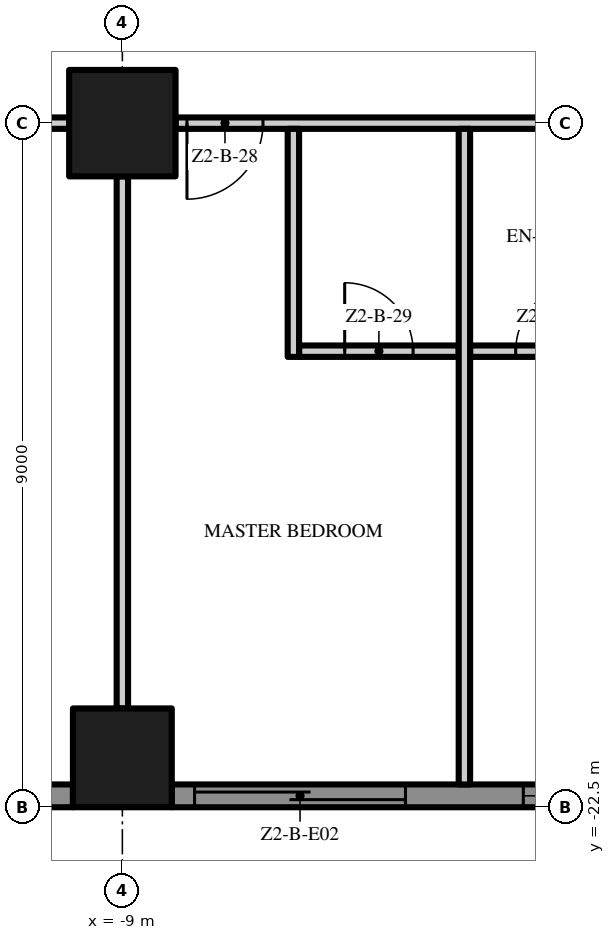
"""IFC4 building model, lengths in metres.
Left out: names, types, materials, properties, quantities, classifications, styles, units other than length and angle.
Written with IfcOpenShell. Run it as: python <this file> out.ifc"""

import sys

from ifc_helpers import new_model, si_unit, direction, frame, frame_2d, origin, origin_2d, place, context, subcontext, project, spatial, polyline, rectangle, outline, extrude, element, fill, save


model = new_model("IFC4")
c1 = context("Model", 3, precision=1e-05, world=origin(), true_north=direction((0.0, 1.0)))
c2 = subcontext(c1, "Body", "Model", "MODEL_VIEW")
j1 = project(units=[si_unit("LENGTHUNIT", "METRE"), si_unit("PLANEANGLEUNIT", "RADIAN")], contexts=[c1])
p1 = place(None, origin())
s1 = spatial("IfcSite", under=j1, at=p1, CompositionType="ELEMENT")
p2 = place(p1, origin())
s2 = spatial("IfcBuilding", under=s1, at=p2, CompositionType="ELEMENT")
p3 = place(p2, frame((0.0, 0.0, 88.4)))
s3 = spatial("IfcBuildingStorey", under=s2, at=p3, CompositionType="ELEMENT", Elevation=88.4)
p4 = place(p3, frame((-9.0, -13.5, 0.0), z_axis=(0.0, 0.0, 1.0), x_axis=(1.0, 0.0, 0.0)))
e1 = element("IfcColumn", 1, at=p4, inside=s3, PredefinedType="COLUMN", context=c2, shape_type="SweptSolid", body=[
    extrude(rectangle(XDim=1.4, YDim=1.4, at=origin_2d()), origin(), (0.0, 0.0, 1.0), 3.5),
])
p5 = place(p3, frame((-9.0, -21.85, 0.0), z_axis=(0.0, 0.0, 1.0), x_axis=(1.0, 0.0, 0.0)))
e2 = element("IfcColumn", 2, at=p5, inside=s3, PredefinedType="COLUMN", context=c2, shape_type="SweptSolid", body=[
    extrude(rectangle(XDim=1.3, YDim=1.3, at=origin_2d()), origin(), (0.0, 0.0, 1.0), 3.5),
])
p6 = place(p3, frame((-9.65, -22.35, 0.0), z_axis=(0.0, 0.0, 1.0), x_axis=(-1.0, 0.0, 0.0)))
e3 = element("IfcWall", 3, at=p6, inside=s3, PredefinedType="SOLIDWALL", context=c2, shape_type="SweptSolid", body=[
    extrude(rectangle(XDim=7.7, YDim=0.3, at=frame_2d((3.85, 0.0))), origin(), (0.0, 0.0, 1.0), 3.5),
])
p7 = place(p6, frame((4.625, 0.0, 0.45)))
e4 = element("IfcOpeningElement", 4, at=p7, cuts=e3, PredefinedType="OPENING", context=c2, shape_type="SweptSolid", body=[
    extrude(rectangle(XDim=2.775, YDim=2.65, at=frame_2d((1.387, 1.325))), frame((0.0, 0.16, 0.0), z_axis=(0.0, -1.0, 0.0), x_axis=(1.0, 0.0, 0.0)), (0.0, 0.0, 1.0), 0.32),
])
p8 = place(p6, frame((0.3, 0.0, 0.0)))
e5 = element("IfcOpeningElement", 5, at=p8, cuts=e3, PredefinedType="OPENING", context=c2, shape_type="SweptSolid", body=[
    extrude(rectangle(XDim=2.775, YDim=2.4, at=frame_2d((1.387, 1.2))), frame((0.0, 0.16, 0.0), z_axis=(0.0, -1.0, 0.0), x_axis=(1.0, 0.0, 0.0)), (0.0, 0.0, 1.0), 0.32),
])
p9 = place(p3, frame((-0.65, -22.35, 0.0), z_axis=(0.0, 0.0, 1.0), x_axis=(-1.0, 0.0, 0.0)))
e6 = element("IfcWall", 6, at=p9, inside=s3, PredefinedType="SOLIDWALL", context=c2, shape_type="SweptSolid", body=[
    extrude(rectangle(XDim=7.7, YDim=0.3, at=frame_2d((3.85, 0.0))), origin(), (0.0, 0.0, 1.0), 3.5),
])
p10 = place(p9, frame((4.625, 0.0, 0.0)))
e7 = element("IfcOpeningElement", 7, at=p10, cuts=e6, PredefinedType="OPENING", context=c2, shape_type="SweptSolid", body=[
    extrude(rectangle(XDim=2.775, YDim=2.4, at=frame_2d((1.387, 1.2))), frame((0.0, 0.16, 0.0), z_axis=(0.0, -1.0, 0.0), x_axis=(1.0, 0.0, 0.0)), (0.0, 0.0, 1.0), 0.32),
])
p11 = place(p9, frame((0.3, 0.0, 0.45)))
e8 = element("IfcOpeningElement", 8, at=p11, cuts=e6, PredefinedType="OPENING", context=c2, shape_type="SweptSolid", body=[
    extrude(rectangle(XDim=2.775, YDim=2.65, at=frame_2d((1.387, 1.325))), frame((0.0, 0.16, 0.0), z_axis=(0.0, -1.0, 0.0), x_axis=(1.0, 0.0, 0.0)), (0.0, 0.0, 1.0), 0.32),
])
p12 = place(p3, origin())
e9 = element("IfcWall", 9, at=p12, inside=s3, PredefinedType="USERDEFINED", context=c2, shape_type="SweptSolid", body=[
    extrude(outline(polyline([(-22.5, -25.149), (-21.0, -24.488), (-19.5, -23.755), (-18.0, -23.231), (-16.875, -23.1), (-16.5, -23.115), (-15.0, -23.451), (-13.5, -24.112), (-12.0, -24.845), (-10.5, -25.369), (-9.375, -25.5), (-9.0, -25.485), (-7.5, -25.149), (-6.0, -24.488), (-4.5, -23.755), (-3.0, -23.231), (-1.875, -23.1), (-1.5, -23.115), (0.0, -23.451), (1.5, -24.112), (3.0, -24.845), (4.5, -25.369), (5.625, -25.5), (6.0, -25.485), (7.5, -25.149), (9.0, -24.488), (10.5, -23.755), (12.0, -23.231), (13.125, -23.1), (13.5, -23.115), (15.0, -23.451), (16.5, -24.112), (18.0, -24.845), (19.5, -25.369), (20.625, -25.5), (21.0, -25.485), (22.5, -25.149), (22.445, -24.905), (20.967, -25.236), (20.635, -25.249), (19.556, -25.124), (18.096, -24.614), (16.605, -23.885), (15.079, -23.213), (13.533, -22.866), (13.115, -22.849), (11.944, -22.986), (10.404, -23.524), (8.895, -24.261), (7.421, -24.91), (5.967, -25.236), (5.635, -25.249), (4.556, -25.124), (3.096, -24.614), (1.605, -23.885), (0.079, -23.213), (-1.467, -22.866), (-1.885, -22.849), (-3.056, -22.986), (-4.596, -23.524), (-6.105, -24.261), (-7.579, -24.91), (-9.033, -25.236), (-9.365, -25.249), (-10.444, -25.124), (-11.904, -24.614), (-13.395, -23.885), (-14.921, -23.213), (-16.467, -22.866), (-16.885, -22.849), (-18.056, -22.986), (-19.596, -23.524), (-21.105, -24.261), (-22.601, -24.92), (-22.5, -25.149)])), origin(), (0.0, 0.0, 1.0), 0.9),
])
p13 = place(p3, frame((-6.675, -16.5, 0.0), z_axis=(0.0, 0.0, 1.0), x_axis=(1.0, 0.0, 0.0)))
e10 = element("IfcWall", 10, at=p13, inside=s3, PredefinedType="PARTITIONING", context=c2, shape_type="SweptSolid", body=[
    extrude(rectangle(XDim=2.1, YDim=0.15, at=frame_2d((1.05, 0.0))), origin(), (0.0, 0.0, 1.0), 3.5),
])
p14 = place(p13, frame((0.6, 0.0, 0.0)))
e11 = element("IfcOpeningElement", 11, at=p14, cuts=e10, PredefinedType="OPENING", context=c2, shape_type="SweptSolid", body=[
    extrude(rectangle(XDim=0.9, YDim=2.1, at=frame_2d((0.45, 1.05))), frame((0.0, 0.085, 0.0), z_axis=(0.0, -1.0, 0.0), x_axis=(1.0, 0.0, 0.0)), (0.0, 0.0, 1.0), 0.17),
])
p15 = place(p3, frame((-4.425, -16.5, 0.0), z_axis=(0.0, 0.0, 1.0), x_axis=(1.0, 0.0, 0.0)))
e12 = element("IfcWall", 12, at=p15, inside=s3, PredefinedType="PARTITIONING", context=c2, shape_type="SweptSolid", body=[
    extrude(rectangle(XDim=2.1, YDim=0.15, at=frame_2d((1.05, 0.0))), origin(), (0.0, 0.0, 1.0), 3.5),
])
p16 = place(p15, frame((0.6, 0.0, 0.0)))
e13 = element("IfcOpeningElement", 13, at=p16, cuts=e12, PredefinedType="OPENING", context=c2, shape_type="SweptSolid", body=[
    extrude(rectangle(XDim=0.9, YDim=2.1, at=frame_2d((0.45, 1.05))), frame((0.0, 0.085, 0.0), z_axis=(0.0, -1.0, 0.0), x_axis=(1.0, 0.0, 0.0)), (0.0, 0.0, 1.0), 0.17),
])
p17 = place(p3, frame((-9.7, -13.5, 0.0), z_axis=(0.0, 0.0, 1.0), x_axis=(-1.0, 0.0, 0.0)))
e14 = element("IfcWall", 14, at=p17, inside=s3, PredefinedType="PARTITIONING", context=c2, shape_type="SweptSolid", body=[
    extrude(rectangle(XDim=7.6, YDim=0.15, at=frame_2d((3.8, 0.0))), origin(), (0.0, 0.0, 1.0), 3.5),
])
p18 = place(p17, frame((4.0, 0.0, 0.0)))
e15 = element("IfcOpeningElement", 15, at=p18, cuts=e14, PredefinedType="OPENING", context=c2, shape_type="SweptSolid", body=[
    extrude(rectangle(XDim=1.8, YDim=2.4, at=frame_2d((0.9, 1.2))), frame((0.0, 0.085, 0.0), z_axis=(0.0, -1.0, 0.0), x_axis=(1.0, 0.0, 0.0)), (0.0, 0.0, 1.0), 0.17),
])
p19 = place(p3, frame((-0.7, -13.5, 0.0), z_axis=(0.0, 0.0, 1.0), x_axis=(-1.0, 0.0, 0.0)))
e16 = element("IfcWall", 16, at=p19, inside=s3, PredefinedType="PARTITIONING", context=c2, shape_type="SweptSolid", body=[
    extrude(rectangle(XDim=7.6, YDim=0.15, at=frame_2d((3.8, 0.0))), origin(), (0.0, 0.0, 1.0), 3.5),
])
p20 = place(p19, frame((6.45, 0.0, 0.0)))
e17 = element("IfcOpeningElement", 17, at=p20, cuts=e16, PredefinedType="OPENING", context=c2, shape_type="SweptSolid", body=[
    extrude(rectangle(XDim=1.0, YDim=2.4, at=frame_2d((0.5, 1.2))), frame((0.0, 0.085, 0.0), z_axis=(0.0, -1.0, 0.0), x_axis=(1.0, 0.0, 0.0)), (0.0, 0.0, 1.0), 0.17),
])
p21 = place(p19, frame((0.15, 0.0, 0.0)))
e18 = element("IfcOpeningElement", 18, at=p21, cuts=e16, PredefinedType="OPENING", context=c2, shape_type="SweptSolid", body=[
    extrude(rectangle(XDim=1.0, YDim=2.4, at=frame_2d((0.5, 1.2))), frame((0.0, 0.085, 0.0), z_axis=(0.0, -1.0, 0.0), x_axis=(1.0, 0.0, 0.0)), (0.0, 0.0, 1.0), 0.17),
])
p22 = place(p3, frame((-9.0, -21.2, 0.0), z_axis=(0.0, 0.0, 1.0), x_axis=(0.0, 1.0, 0.0)))
e19 = element("IfcWall", 19, at=p22, inside=s3, PredefinedType="PARTITIONING", context=c2, shape_type="SweptSolid", body=[
    extrude(rectangle(XDim=7.0, YDim=0.15, at=frame_2d((3.5, 0.0))), origin(), (0.0, 0.0, 1.0), 3.5),
])
p23 = place(p3, frame((-6.75, -16.575, 0.0), z_axis=(0.0, 0.0, 1.0), x_axis=(0.0, 1.0, 0.0)))
e20 = element("IfcWall", 20, at=p23, inside=s3, PredefinedType="PARTITIONING", context=c2, shape_type="SweptSolid", body=[
    extrude(rectangle(XDim=3.0, YDim=0.15, at=frame_2d((1.5, 0.0))), origin(), (0.0, 0.0, 1.0), 3.5),
])
p24 = place(p3, frame((-4.5, -22.2, 0.0), z_axis=(0.0, 0.0, 1.0), x_axis=(0.0, 1.0, 0.0)))
e21 = element("IfcWall", 21, at=p24, inside=s3, PredefinedType="PARTITIONING", context=c2, shape_type="SweptSolid", body=[
    extrude(rectangle(XDim=8.625, YDim=0.15, at=frame_2d((4.312, 0.0))), origin(), (0.0, 0.0, 1.0), 3.5),
])
p25 = place(p10, origin())
e22 = element("IfcDoor", 22, at=p25, inside=s3, OperationType="SINGLE_SWING_LEFT", PredefinedType="DOOR", context=c2, shape_type="SweptSolid", body=[
    extrude(rectangle(XDim=2.775, YDim=2.4, at=frame_2d((1.387, 1.2))), frame((0.0, 0.025, 0.0), z_axis=(0.0, -1.0, 0.0), x_axis=(1.0, 0.0, 0.0)), (0.0, 0.0, 1.0), 0.05),
])
fill(e7, e22)
p26 = place(p11, origin())
e23 = element("IfcWindow", 23, at=p26, inside=s3, PartitioningType="SINGLE_PANEL", PredefinedType="WINDOW", context=c2, shape_type="SweptSolid", body=[
    extrude(rectangle(XDim=2.775, YDim=2.65, at=frame_2d((1.387, 1.325))), frame((0.0, 0.03, 0.0), z_axis=(0.0, -1.0, 0.0), x_axis=(1.0, 0.0, 0.0)), (0.0, 0.0, 1.0), 0.06),
])
fill(e8, e23)
p27 = place(p20, origin())
e24 = element("IfcDoor", 24, at=p27, inside=s3, OperationType="SINGLE_SWING_RIGHT", PredefinedType="DOOR", context=c2, shape_type="SweptSolid", body=[
    extrude(rectangle(XDim=1.0, YDim=2.4, at=frame_2d((0.5, 1.2))), frame((0.0, 0.025, 0.0), z_axis=(0.0, -1.0, 0.0), x_axis=(1.0, 0.0, 0.0)), (0.0, 0.0, 1.0), 0.05),
])
fill(e17, e24)
p28 = place(p14, origin())
e25 = element("IfcDoor", 25, at=p28, inside=s3, OperationType="SINGLE_SWING_LEFT", PredefinedType="DOOR", context=c2, shape_type="SweptSolid", body=[
    extrude(rectangle(XDim=0.9, YDim=2.1, at=frame_2d((0.45, 1.05))), frame((0.0, 0.025, 0.0), z_axis=(0.0, -1.0, 0.0), x_axis=(1.0, 0.0, 0.0)), (0.0, 0.0, 1.0), 0.05),
])
fill(e11, e25)
p29 = place(p16, origin())
e26 = element("IfcDoor", 26, at=p29, inside=s3, OperationType="SINGLE_SWING_RIGHT", PredefinedType="DOOR", context=c2, shape_type="SweptSolid", body=[
    extrude(rectangle(XDim=0.9, YDim=2.1, at=frame_2d((0.45, 1.05))), frame((0.0, 0.025, 0.0), z_axis=(0.0, -1.0, 0.0), x_axis=(1.0, 0.0, 0.0)), (0.0, 0.0, 1.0), 0.05),
])
fill(e13, e26)
save(model, sys.argv[1])
